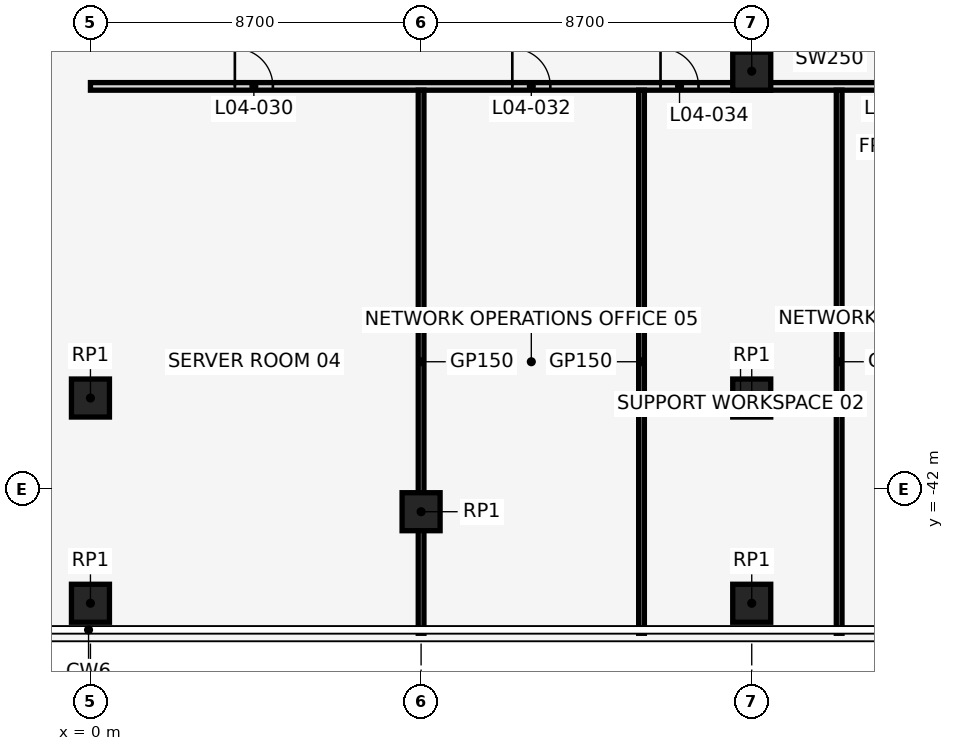
"""IFC4 building model, lengths in metres.
Left out: names, types, materials, properties, quantities, classifications, styles, units other than length and angle.
Written with IfcOpenShell. Run it as: python <this file> out.ifc"""

import sys

from ifc_helpers import new_model, si_unit, direction, frame, frame_2d, origin, origin_2d, place, context, subcontext, project, spatial, rectangle, extrude, element, fill, save


model = new_model("IFC4")
c1 = context("Model", 3, precision=1e-05, world=origin(), true_north=direction((0.0, 1.0)))
c2 = subcontext(c1, "Body", "Model", "MODEL_VIEW")
j1 = project(units=[si_unit("LENGTHUNIT", "METRE"), si_unit("PLANEANGLEUNIT", "RADIAN")], contexts=[c1])
p1 = place(None, origin())
s1 = spatial("IfcSite", under=j1, at=p1, CompositionType="ELEMENT")
p2 = place(p1, origin())
s2 = spatial("IfcBuilding", under=s1, at=p2, CompositionType="ELEMENT")
p3 = place(p2, frame((0.0, 0.0, 25.0)))
s3 = spatial("IfcBuildingStorey", under=s2, at=p3, CompositionType="ELEMENT", Elevation=25.0)
for number, where, z_axis, x_axis in (
    (1, (0.0, -39.6, -0.3), (0.0, 0.0, 1.0), (1.0, 0.0, 0.0)),
    (2, (8.7, -42.591, -0.3), (0.0, 0.0, 1.0), (1.0, 0.0, 0.0)),
):
    element("IfcColumn", number, at=place(p3, frame(where, z_axis=z_axis, x_axis=x_axis)), inside=s3, PredefinedType="COLUMN", context=c2, shape_type="SweptSolid", body=[
        extrude(rectangle(XDim=1.0, YDim=1.0, at=origin_2d()), origin(), (0.0, 0.0, 1.0), 5.3),
    ])
for number, where, z_axis, x_axis in (
    (3, (17.4, -39.6, 0.0), (0.0, 0.0, 1.0), (1.0, 0.0, 0.0)),
    (4, (0.0, -45.0, 0.0), (0.0, 0.0, 1.0), (1.0, 0.0, 0.0)),
    (5, (17.4, -31.0, 0.0), (0.0, 0.0, 1.0), (1.0, 0.0, 0.0)),
    (6, (17.4, -45.0, 0.0), (0.0, 0.0, 1.0), (1.0, 0.0, 0.0)),
):
    element("IfcColumn", number, at=place(p3, frame(where, z_axis=z_axis, x_axis=x_axis)), inside=s3, PredefinedType="COLUMN", context=c2, shape_type="SweptSolid", body=[
        extrude(rectangle(XDim=1.0, YDim=1.0, at=origin_2d()), origin(), (0.0, 0.0, 1.0), 5.0),
    ])
p4 = place(p3, frame((0.0, -31.4, 0.0), z_axis=(0.0, 0.0, 1.0), x_axis=(1.0, 0.0, 0.0)))
e7 = element("IfcWall", 7, at=p4, inside=s3, PredefinedType="PARTITIONING", context=c2, shape_type="SweptSolid", body=[
    extrude(rectangle(XDim=42.0, YDim=0.2, at=frame_2d((21.0, 0.0))), origin(), (0.0, 0.0, 1.0), 4.7),
])
p5 = place(p4, frame((3.8, 0.0, 0.0)))
e8 = element("IfcOpeningElement", 8, at=p5, cuts=e7, PredefinedType="OPENING", context=c2, shape_type="SweptSolid", body=[
    extrude(rectangle(XDim=1.0, YDim=2.1, at=frame_2d((0.5, 1.05))), frame((0.0, 0.112, 0.0), z_axis=(0.0, -1.0, 0.0), x_axis=(1.0, 0.0, 0.0)), (0.0, 0.0, 1.0), 0.224),
])
p6 = place(p4, frame((11.1, 0.0, 0.0)))
e9 = element("IfcOpeningElement", 9, at=p6, cuts=e7, PredefinedType="OPENING", context=c2, shape_type="SweptSolid", body=[
    extrude(rectangle(XDim=1.0, YDim=2.1, at=frame_2d((0.5, 1.05))), frame((0.0, 0.112, 0.0), z_axis=(0.0, -1.0, 0.0), x_axis=(1.0, 0.0, 0.0)), (0.0, 0.0, 1.0), 0.224),
])
p7 = place(p4, frame((15.0, 0.0, 0.0)))
e10 = element("IfcOpeningElement", 10, at=p7, cuts=e7, PredefinedType="OPENING", context=c2, shape_type="SweptSolid", body=[
    extrude(rectangle(XDim=1.0, YDim=2.1, at=frame_2d((0.5, 1.05))), frame((0.0, 0.112, 0.0), z_axis=(0.0, -1.0, 0.0), x_axis=(1.0, 0.0, 0.0)), (0.0, 0.0, 1.0), 0.224),
])
p8 = place(p4, frame((20.9, 0.0, 0.0)))
e11 = element("IfcOpeningElement", 11, at=p8, cuts=e7, PredefinedType="OPENING", context=c2, shape_type="SweptSolid", body=[
    extrude(rectangle(XDim=1.0, YDim=2.1, at=frame_2d((0.5, 1.05))), frame((0.0, 0.112, 0.0), z_axis=(0.0, -1.0, 0.0), x_axis=(1.0, 0.0, 0.0)), (0.0, 0.0, 1.0), 0.224),
])
p9 = place(p4, frame((23.8, 0.0, 0.0)))
e12 = element("IfcOpeningElement", 12, at=p9, cuts=e7, PredefinedType="OPENING", context=c2, shape_type="SweptSolid", body=[
    extrude(rectangle(XDim=1.0, YDim=2.1, at=frame_2d((0.5, 1.05))), frame((0.0, 0.112, 0.0), z_axis=(0.0, -1.0, 0.0), x_axis=(1.0, 0.0, 0.0)), (0.0, 0.0, 1.0), 0.224),
])
p10 = place(p4, frame((32.5, 0.0, 0.0)))
e13 = element("IfcOpeningElement", 13, at=p10, cuts=e7, PredefinedType="OPENING", context=c2, shape_type="SweptSolid", body=[
    extrude(rectangle(XDim=1.0, YDim=2.1, at=frame_2d((0.5, 1.05))), frame((0.0, 0.112, 0.0), z_axis=(0.0, -1.0, 0.0), x_axis=(1.0, 0.0, 0.0)), (0.0, 0.0, 1.0), 0.224),
])
p11 = place(p4, frame((39.5, 0.0, 0.0)))
e14 = element("IfcOpeningElement", 14, at=p11, cuts=e7, PredefinedType="OPENING", context=c2, shape_type="SweptSolid", body=[
    extrude(rectangle(XDim=1.0, YDim=2.1, at=frame_2d((0.5, 1.05))), frame((0.0, 0.112, 0.0), z_axis=(0.0, -1.0, 0.0), x_axis=(1.0, 0.0, 0.0)), (0.0, 0.0, 1.0), 0.224),
])
for number, where, z_axis, x_axis in (
    (15, (8.7, -45.79, 0.0), (0.0, 0.0, 1.0), (0.0, 1.0, 0.0)),
    (16, (14.5, -45.79, 0.0), (0.0, 0.0, 1.0), (0.0, 1.0, 0.0)),
    (17, (19.7, -45.79, 0.0), (0.0, 0.0, 1.0), (0.0, 1.0, 0.0)),
):
    element("IfcWall", number, at=place(p3, frame(where, z_axis=z_axis, x_axis=x_axis)), inside=s3, PredefinedType="PARTITIONING", context=c2, shape_type="SweptSolid", body=[
        extrude(rectangle(XDim=14.29, YDim=0.15, at=frame_2d((7.145, 0.0))), origin(), (0.0, 0.0, 1.0), 4.7),
    ])
p12 = place(p5, frame((1.0, 0.0, 0.0), z_axis=(0.0, 0.0, 1.0), x_axis=(-1.0, 0.0, 0.0)))
e18 = element("IfcDoor", 18, at=p12, inside=s3, OperationType="SINGLE_SWING_RIGHT", PredefinedType="DOOR", context=c2, shape_type="SweptSolid", body=[
    extrude(rectangle(XDim=1.0, YDim=2.1, at=frame_2d((0.5, 1.05))), frame((0.0, 0.025, 0.0), z_axis=(0.0, -1.0, 0.0), x_axis=(1.0, 0.0, 0.0)), (0.0, 0.0, 1.0), 0.05),
])
fill(e8, e18)
p13 = place(p6, frame((1.0, 0.0, 0.0), z_axis=(0.0, 0.0, 1.0), x_axis=(-1.0, 0.0, 0.0)))
e19 = element("IfcDoor", 19, at=p13, inside=s3, OperationType="SINGLE_SWING_RIGHT", PredefinedType="DOOR", context=c2, shape_type="SweptSolid", body=[
    extrude(rectangle(XDim=1.0, YDim=2.1, at=frame_2d((0.5, 1.05))), frame((0.0, 0.025, 0.0), z_axis=(0.0, -1.0, 0.0), x_axis=(1.0, 0.0, 0.0)), (0.0, 0.0, 1.0), 0.05),
])
fill(e9, e19)
p14 = place(p7, frame((1.0, 0.0, 0.0), z_axis=(0.0, 0.0, 1.0), x_axis=(-1.0, 0.0, 0.0)))
e20 = element("IfcDoor", 20, at=p14, inside=s3, OperationType="SINGLE_SWING_LEFT", PredefinedType="DOOR", context=c2, shape_type="SweptSolid", body=[
    extrude(rectangle(XDim=1.0, YDim=2.1, at=frame_2d((0.5, 1.05))), frame((0.0, 0.025, 0.0), z_axis=(0.0, -1.0, 0.0), x_axis=(1.0, 0.0, 0.0)), (0.0, 0.0, 1.0), 0.05),
])
fill(e10, e20)
save(model, sys.argv[1])
